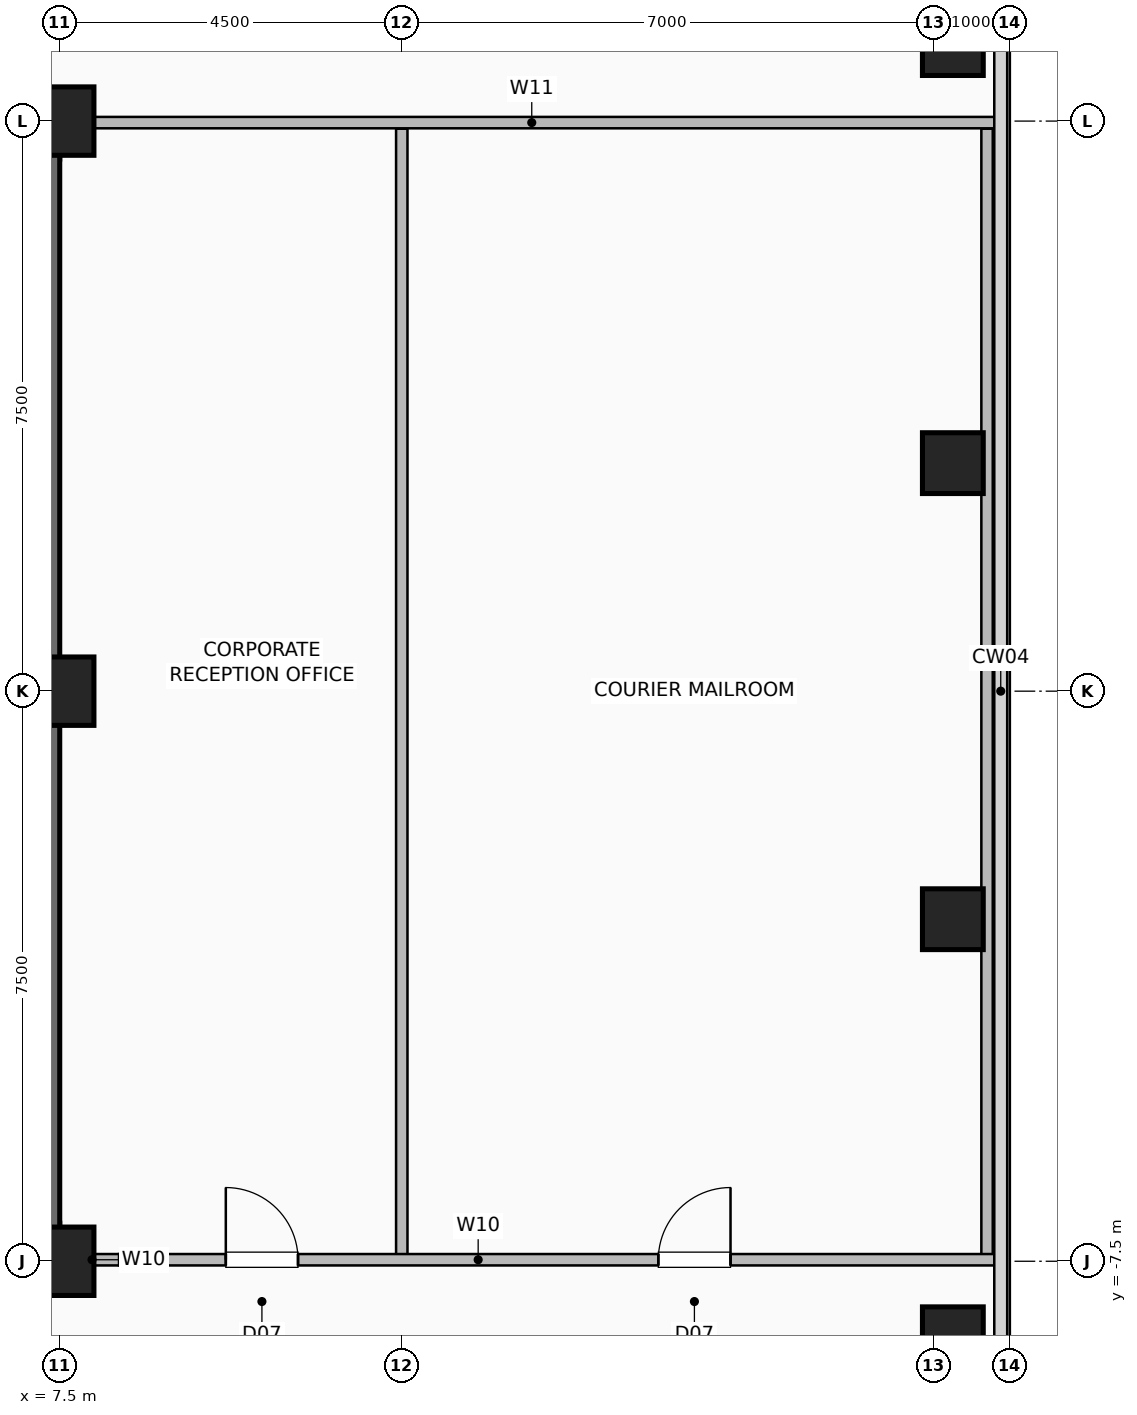
"""IFC4 building model, lengths in metres.
Left out: names, types, materials, properties, quantities, classifications, styles, units other than length and angle.
Written with IfcOpenShell. Run it as: python <this file> out.ifc"""

import sys

from ifc_helpers import new_model, si_unit, direction, frame, frame_2d, origin, origin_2d, place, context, subcontext, project, spatial, rectangle, hollow_rectangle, extrude, element, fill, save


model = new_model("IFC4")
c1 = context("Model", 3, precision=1e-05, world=origin(), true_north=direction((0.0, 1.0)))
c2 = subcontext(c1, "Body", "Model", "MODEL_VIEW")
j1 = project(units=[si_unit("LENGTHUNIT", "METRE"), si_unit("PLANEANGLEUNIT", "RADIAN")], contexts=[c1])
p1 = place(None, origin())
s1 = spatial("IfcSite", under=j1, at=p1, CompositionType="ELEMENT")
p2 = place(p1, origin())
s2 = spatial("IfcBuilding", under=s1, at=p2, CompositionType="ELEMENT")
p3 = place(p2, frame((0.0, 0.0, 166.2)))
s3 = spatial("IfcBuildingStorey", under=s2, at=p3, CompositionType="ELEMENT", Elevation=166.2)
for number, where, z_axis, x_axis in (
    (1, (7.5, -7.5, 0.0), (0.0, 0.0, 1.0), (1.0, 0.0, 0.0)),
    (2, (7.5, 0.0, 0.0), (0.0, 0.0, 1.0), (1.0, 0.0, 0.0)),
    (3, (7.5, 7.5, 0.0), (0.0, 0.0, 1.0), (1.0, 0.0, 0.0)),
):
    element("IfcColumn", number, at=place(p3, frame(where, z_axis=z_axis, x_axis=x_axis)), inside=s3, PredefinedType="COLUMN", context=c2, shape_type="SweptSolid", body=[
        extrude(hollow_rectangle(XDim=0.9, YDim=0.9, WallThickness=0.045, at=origin_2d()), origin(), (0.0, 0.0, 1.0), 3.6),
    ])
for number, where, z_axis, x_axis in (
    (4, (19.25, -8.5, -0.4), (0.0, 0.0, 1.0), (1.0, 0.0, 0.0)),
    (5, (19.25, -3.0, -0.4), (0.0, 0.0, 1.0), (1.0, 0.0, 0.0)),
    (6, (19.25, 3.0, -0.4), (0.0, 0.0, 1.0), (1.0, 0.0, 0.0)),
    (7, (19.25, 8.5, -0.4), (0.0, 0.0, 1.0), (1.0, 0.0, 0.0)),
):
    element("IfcColumn", number, at=place(p3, frame(where, z_axis=z_axis, x_axis=x_axis)), inside=s3, PredefinedType="COLUMN", context=c2, shape_type="SweptSolid", body=[
        extrude(hollow_rectangle(XDim=0.8, YDim=0.8, WallThickness=0.04, at=origin_2d()), origin(), (0.0, 0.0, 1.0), 4.0),
    ])
p4 = place(p3, frame((-7.5, -7.25, 0.0), z_axis=(0.0, 0.0, 1.0), x_axis=(1.0, 0.0, 0.0)))
e8 = element("IfcWall", 8, at=p4, inside=s3, PredefinedType="SHEAR", context=c2, shape_type="SweptSolid", body=[
    extrude(rectangle(XDim=15.0, YDim=0.5, at=frame_2d((7.5, 0.0))), origin(), (0.0, 0.0, 1.0), 3.36),
])
p5 = place(p4, frame((1.55, 0.0, 0.0)))
e9 = element("IfcOpeningElement", 9, at=p5, cuts=e8, PredefinedType="OPENING", context=c2, shape_type="SweptSolid", body=[
    extrude(rectangle(XDim=1.05, YDim=2.08, at=frame_2d((0.525, 1.04))), frame((0.0, 0.26, 0.0), z_axis=(0.0, -1.0, 0.0), x_axis=(1.0, 0.0, 0.0)), (0.0, 0.0, 1.0), 0.52),
])
p6 = place(p4, frame((12.4, 0.0, 0.0)))
e10 = element("IfcOpeningElement", 10, at=p6, cuts=e8, PredefinedType="OPENING", context=c2, shape_type="SweptSolid", body=[
    extrude(rectangle(XDim=1.05, YDim=2.08, at=frame_2d((0.525, 1.04))), frame((0.0, 0.26, 0.0), z_axis=(0.0, -1.0, 0.0), x_axis=(1.0, 0.0, 0.0)), (0.0, 0.0, 1.0), 0.52),
])
p7 = place(p4, frame((5.2, 0.0, 0.0)))
e11 = element("IfcOpeningElement", 11, at=p7, cuts=e8, PredefinedType="OPENING", context=c2, shape_type="SweptSolid", body=[
    extrude(rectangle(XDim=1.0, YDim=2.08, at=frame_2d((0.5, 1.04))), frame((0.0, 0.26, 0.0), z_axis=(0.0, -1.0, 0.0), x_axis=(1.0, 0.0, 0.0)), (0.0, 0.0, 1.0), 0.52),
])
p8 = place(p4, frame((8.65, 0.0, 0.0)))
e12 = element("IfcOpeningElement", 12, at=p8, cuts=e8, PredefinedType="OPENING", context=c2, shape_type="SweptSolid", body=[
    extrude(rectangle(XDim=1.0, YDim=2.08, at=frame_2d((0.5, 1.04))), frame((0.0, 0.26, 0.0), z_axis=(0.0, -1.0, 0.0), x_axis=(1.0, 0.0, 0.0)), (0.0, 0.0, 1.0), 0.52),
])
for number, where, z_axis, x_axis in (
    (13, (-7.5, 7.25, 0.0), (0.0, 0.0, 1.0), (1.0, 0.0, 0.0)),
    (14, (7.25, -7.5, 0.0), (0.0, 0.0, 1.0), (0.0, 1.0, 0.0)),
):
    element("IfcWall", number, at=place(p3, frame(where, z_axis=z_axis, x_axis=x_axis)), inside=s3, PredefinedType="SHEAR", context=c2, shape_type="SweptSolid", body=[
        extrude(rectangle(XDim=15.0, YDim=0.5, at=frame_2d((7.5, 0.0))), origin(), (0.0, 0.0, 1.0), 3.36),
    ])
p9 = place(p3, frame((7.45, -7.48, 0.0), z_axis=(0.0, 0.0, 1.0), x_axis=(1.0, 0.0, 0.0)))
e15 = element("IfcWall", 15, at=p9, inside=s3, PredefinedType="PARTITIONING", context=c2, shape_type="SweptSolid", body=[
    extrude(rectangle(XDim=0.95, YDim=0.15, at=frame_2d((0.475, 0.0))), origin(), (0.0, 0.0, 1.0), 3.36),
])
for number, where, z_axis, x_axis in (
    (16, (12.0, -7.48, 0.0), (0.0, 0.0, 1.0), (0.0, 1.0, 0.0)),
    (17, (19.7, -7.48, 0.0), (0.0, 0.0, 1.0), (0.0, 1.0, 0.0)),
):
    element("IfcWall", number, at=place(p3, frame(where, z_axis=z_axis, x_axis=x_axis)), inside=s3, PredefinedType="PARTITIONING", context=c2, shape_type="SweptSolid", body=[
        extrude(rectangle(XDim=14.88, YDim=0.15, at=frame_2d((7.44, 0.0))), origin(), (0.0, 0.0, 1.0), 3.36),
    ])
p10 = place(p3, frame((8.28, -7.48, 0.0), z_axis=(0.0, 0.0, 1.0), x_axis=(1.0, 0.0, 0.0)))
e18 = element("IfcWall", 18, at=p10, inside=s3, PredefinedType="PARTITIONING", context=c2, shape_type="SweptSolid", body=[
    extrude(rectangle(XDim=11.54, YDim=0.15, at=frame_2d((5.77, 0.0))), origin(), (0.0, 0.0, 1.0), 3.36),
])
p11 = place(p10, frame((1.405, 0.0, 0.0)))
e19 = element("IfcOpeningElement", 19, at=p11, cuts=e18, PredefinedType="OPENING", context=c2, shape_type="SweptSolid", body=[
    extrude(rectangle(XDim=0.95, YDim=2.06, at=frame_2d((0.475, 1.03))), frame((0.0, 0.085, 0.0), z_axis=(0.0, -1.0, 0.0), x_axis=(1.0, 0.0, 0.0)), (0.0, 0.0, 1.0), 0.17),
])
p12 = place(p10, frame((7.095, 0.0, 0.0)))
e20 = element("IfcOpeningElement", 20, at=p12, cuts=e18, PredefinedType="OPENING", context=c2, shape_type="SweptSolid", body=[
    extrude(rectangle(XDim=0.95, YDim=2.06, at=frame_2d((0.475, 1.03))), frame((0.0, 0.085, 0.0), z_axis=(0.0, -1.0, 0.0), x_axis=(1.0, 0.0, 0.0)), (0.0, 0.0, 1.0), 0.17),
])
p13 = place(p3, frame((7.6, 7.48, 0.0), z_axis=(0.0, 0.0, 1.0), x_axis=(1.0, 0.0, 0.0)))
e21 = element("IfcWall", 21, at=p13, inside=s3, PredefinedType="PARTITIONING", context=c2, shape_type="SweptSolid", body=[
    extrude(rectangle(XDim=12.22, YDim=0.15, at=frame_2d((6.11, 0.0))), origin(), (0.0, 0.0, 1.0), 3.36),
])
p14 = place(p11, origin())
e22 = element("IfcDoor", 22, at=p14, inside=s3, OperationType="SINGLE_SWING_LEFT", PredefinedType="DOOR", context=c2, shape_type="SweptSolid", body=[
    extrude(rectangle(XDim=0.95, YDim=2.06, at=frame_2d((0.475, 1.03))), frame((0.0, 0.025, 0.0), z_axis=(0.0, -1.0, 0.0), x_axis=(1.0, 0.0, 0.0)), (0.0, 0.0, 1.0), 0.05),
])
fill(e19, e22)
p15 = place(p12, origin())
e23 = element("IfcDoor", 23, at=p15, inside=s3, OperationType="SINGLE_SWING_RIGHT", PredefinedType="DOOR", context=c2, shape_type="SweptSolid", body=[
    extrude(rectangle(XDim=0.95, YDim=2.06, at=frame_2d((0.475, 1.03))), frame((0.0, 0.025, 0.0), z_axis=(0.0, -1.0, 0.0), x_axis=(1.0, 0.0, 0.0)), (0.0, 0.0, 1.0), 0.05),
])
fill(e20, e23)
save(model, sys.argv[1])
